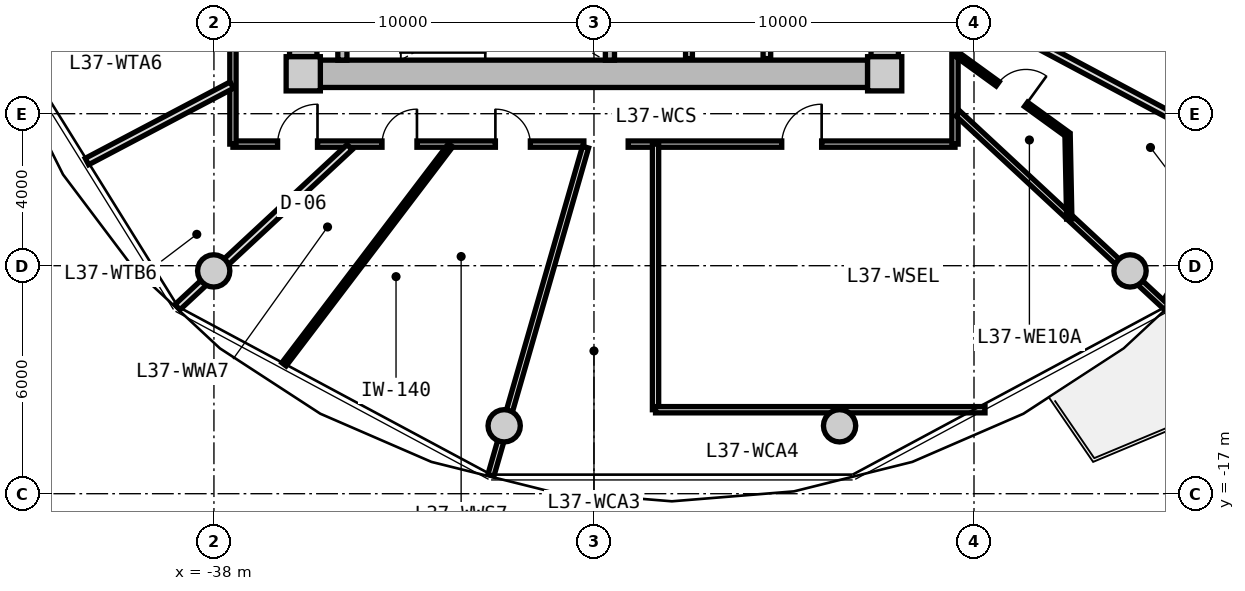
"""IFC4 building model, lengths in metres.
Left out: names, types, materials, properties, quantities, classifications, styles, units other than length and angle.
Written with IfcOpenShell. Run it as: python <this file> out.ifc"""

import sys

from ifc_helpers import new_model, si_unit, direction, frame, frame_2d, origin, origin_2d, place, context, subcontext, project, spatial, rectangle, circle, extrude, source, transform, mapped, element, fill, save


model = new_model("IFC4")
c1 = context("Model", 3, precision=1e-05, world=origin(), true_north=direction((0.0, 1.0)))
c2 = subcontext(c1, "Body", "Model", "MODEL_VIEW")
j1 = project(units=[si_unit("LENGTHUNIT", "METRE"), si_unit("PLANEANGLEUNIT", "RADIAN")], contexts=[c1])
p1 = place(None, origin())
s1 = spatial("IfcSite", under=j1, at=p1, CompositionType="ELEMENT")
p2 = place(p1, origin())
s2 = spatial("IfcBuilding", under=s1, at=p2, CompositionType="ELEMENT")
p3 = place(p2, frame((0.0, 0.0, 120.65)))
s3 = spatial("IfcBuildingStorey", under=s2, at=p3, CompositionType="ELEMENT", Elevation=120.65)
m1 = source(origin(), c2, "Body", "SweptSolid", [
    extrude(rectangle(XDim=0.9, YDim=0.9, at=origin_2d()), origin(), (0.0, 0.0, 1.0), 3.05),
])
for number, where, z_axis, x_axis in (
    (1, (-35.65, -5.95, 0.0), (0.0, 0.0, 1.0), (1.0, 0.0, 0.0)),
    (2, (-20.35, -5.95, 0.0), (0.0, 0.0, 1.0), (1.0, 0.0, 0.0)),
):
    element("IfcColumn", number, at=place(p3, frame(where, z_axis=z_axis, x_axis=x_axis)), inside=s3, PredefinedType="COLUMN", context=c2, shape_type="MappedRepresentation", body=[
        mapped(m1, transform((0.0, 0.0, 0.0), x_axis=(1.0, 0.0, 0.0), y_axis=(0.0, 1.0, 0.0), z_axis=(0.0, 0.0, 1.0), scale=1.0)),
    ])
m2 = source(origin(), c2, "Body", "SweptSolid", [
    extrude(rectangle(XDim=14.4, YDim=0.72, at=frame_2d((7.2, 0.0))), origin(), (0.0, 0.0, 1.0), 2.79),
])
p4 = place(p3, frame((-20.8, -5.95, 0.0), z_axis=(0.0, 0.0, 1.0), x_axis=(-1.0, 0.0, 0.0)))
e3 = element("IfcWall", 3, at=p4, inside=s3, PredefinedType="SHEAR", context=c2, shape_type="MappedRepresentation", body=[
    mapped(m2, transform((0.0, 0.0, 0.0), x_axis=(1.0, 0.0, 0.0), y_axis=(0.0, 1.0, 0.0), z_axis=(0.0, 0.0, 1.0), scale=1.0)),
])
m3 = source(origin(), c2, "Body", "SweptSolid", [
    extrude(rectangle(XDim=11.0, YDim=0.72, at=frame_2d((5.5, 0.0))), origin(), (0.0, 0.0, 1.0), 2.79),
])
p5 = place(p3, frame((-35.65, -5.5, 0.0), z_axis=(0.0, 0.0, 1.0), x_axis=(0.0, 1.0, 0.0)))
e4 = element("IfcWall", 4, at=p5, inside=s3, PredefinedType="SHEAR", context=c2, shape_type="MappedRepresentation", body=[
    mapped(m3, transform((0.0, 0.0, 0.0), x_axis=(1.0, 0.0, 0.0), y_axis=(0.0, 1.0, 0.0), z_axis=(0.0, 0.0, 1.0), scale=1.0)),
])
p6 = place(p5, frame((3.8, 0.0, 0.0)))
e5 = element("IfcOpeningElement", 5, at=p6, cuts=e4, PredefinedType="OPENING", context=c2, shape_type="SweptSolid", body=[
    extrude(rectangle(XDim=1.2, YDim=2.15, at=frame_2d((0.6, 1.075))), frame((0.0, 0.37, 0.0), z_axis=(0.0, -1.0, 0.0), x_axis=(1.0, 0.0, 0.0)), (0.0, 0.0, 1.0), 0.74),
])
p7 = place(p3, frame((-20.35, 5.5, 0.0), z_axis=(0.0, 0.0, 1.0), x_axis=(0.0, -1.0, 0.0)))
e6 = element("IfcWall", 6, at=p7, inside=s3, PredefinedType="SHEAR", context=c2, shape_type="MappedRepresentation", body=[
    mapped(m3, transform((0.0, 0.0, 0.0), x_axis=(1.0, 0.0, 0.0), y_axis=(0.0, 1.0, 0.0), z_axis=(0.0, 0.0, 1.0), scale=1.0)),
])
p8 = place(p7, frame((5.65, 0.0, 0.0)))
e7 = element("IfcOpeningElement", 7, at=p8, cuts=e6, PredefinedType="OPENING", context=c2, shape_type="SweptSolid", body=[
    extrude(rectangle(XDim=1.2, YDim=2.15, at=frame_2d((0.6, 1.075))), frame((0.0, 0.37, 0.0), z_axis=(0.0, -1.0, 0.0), x_axis=(1.0, 0.0, 0.0)), (0.0, 0.0, 1.0), 0.74),
])
m4 = source(origin(), c2, "Body", "SweptSolid", [
    extrude(circle(Radius=0.425, at=origin_2d()), origin(), (0.0, 0.0, 1.0), 3.05),
])
for number, where, z_axis, x_axis in (
    (8, (-38.006, -11.137, 0.0), (0.0, 0.0, 1.0), (1.0, 0.0, 0.0)),
    (9, (-30.363, -15.213, 0.0), (0.0, 0.0, 1.0), (1.0, 0.0, 0.0)),
    (10, (-21.537, -15.213, 0.0), (0.0, 0.0, 1.0), (1.0, 0.0, 0.0)),
    (11, (-13.894, -11.137, 0.0), (0.0, 0.0, 1.0), (1.0, 0.0, 0.0)),
):
    element("IfcColumn", number, at=place(p3, frame(where, z_axis=z_axis, x_axis=x_axis)), inside=s3, PredefinedType="COLUMN", context=c2, shape_type="MappedRepresentation", body=[
        mapped(m4, transform((0.0, 0.0, 0.0), x_axis=(1.0, 0.0, 0.0), y_axis=(0.0, 1.0, 0.0), z_axis=(0.0, 0.0, 1.0), scale=1.0)),
    ])
m5 = source(origin(), c2, "Body", "SweptSolid", [
    extrude(rectangle(XDim=9.014, YDim=0.29, at=frame_2d((4.507, 0.0))), origin(), (0.0, 0.0, 1.0), 2.79),
])
p9 = place(p3, frame((-8.196, -4.421, 0.0), z_axis=(0.0, 0.0, 1.0), x_axis=(-0.527732945084, -0.849410347637, 0.0)))
e12 = element("IfcWall", 12, at=p9, inside=s3, PredefinedType="SOLIDWALL", context=c2, shape_type="MappedRepresentation", body=[
    mapped(m5, transform((0.0, 0.0, 0.0), x_axis=(1.0, 0.0, 0.0), y_axis=(0.0, 1.0, 0.0), z_axis=(0.0, 0.0, 1.0), scale=1.0)),
])
p10 = place(p9, frame((6.98, 0.0, 0.0)))
e13 = element("IfcOpeningElement", 13, at=p10, cuts=e12, PredefinedType="OPENING", context=c2, shape_type="SweptSolid", body=[
    extrude(rectangle(XDim=1.15, YDim=2.25, at=frame_2d((0.575, 1.125))), frame((0.0, 0.155, 0.0), z_axis=(0.0, -1.0, 0.0), x_axis=(1.0, 0.0, 0.0)), (0.0, 0.0, 1.0), 0.31),
])
p11 = place(p9, frame((0.85, 0.0, 0.85)))
e14 = element("IfcOpeningElement", 14, at=p11, cuts=e12, PredefinedType="OPENING", context=c2, shape_type="SweptSolid", body=[
    extrude(rectangle(XDim=1.2, YDim=1.5, at=frame_2d((0.6, 0.75))), frame((0.0, 0.155, 0.0), z_axis=(0.0, -1.0, 0.0), x_axis=(1.0, 0.0, 0.0)), (0.0, 0.0, 1.0), 0.31),
])
m6 = source(origin(), c2, "Body", "SweptSolid", [
    extrude(rectangle(XDim=3.14, YDim=0.24, at=frame_2d((1.57, 0.0))), origin(), (0.0, 0.0, 1.0), 2.79),
])
for number, where, z_axis, x_axis in (
    (15, (-34.62, -5.59, 0.0), (0.0, 0.0, 1.0), (0.0, 1.0, 0.0)),
    (16, (-27.58, -5.59, 0.0), (0.0, 0.0, 1.0), (0.0, 1.0, 0.0)),
):
    element("IfcWall", number, at=place(p3, frame(where, z_axis=z_axis, x_axis=x_axis)), inside=s3, PredefinedType="PARTITIONING", context=c2, shape_type="MappedRepresentation", body=[
        mapped(m6, transform((0.0, 0.0, 0.0), x_axis=(1.0, 0.0, 0.0), y_axis=(0.0, 1.0, 0.0), z_axis=(0.0, 0.0, 1.0), scale=1.0)),
    ])
m7 = source(origin(), c2, "Body", "SweptSolid", [
    extrude(rectangle(XDim=3.8, YDim=0.2, at=frame_2d((1.9, 0.0))), origin(), (0.0, 0.0, 1.0), 2.775),
])
p12 = place(p3, frame((-23.45, -5.55, 0.0), z_axis=(0.0, 0.0, 1.0), x_axis=(0.0, 1.0, 0.0)))
e17 = element("IfcWall", 17, at=p12, inside=s3, PredefinedType="PARTITIONING", context=c2, shape_type="MappedRepresentation", body=[
    mapped(m7, transform((0.0, 0.0, 0.0), x_axis=(1.0, 0.0, 0.0), y_axis=(0.0, 1.0, 0.0), z_axis=(0.0, 0.0, 1.0), scale=1.0)),
])
m8 = source(origin(), c2, "Body", "SweptSolid", [
    extrude(rectangle(XDim=3.22, YDim=0.18, at=frame_2d((1.61, 0.0))), origin(), (0.0, 0.0, 1.0), 2.775),
])
p13 = place(p3, frame((-25.5, -5.55, 0.0), z_axis=(0.0, 0.0, 1.0), x_axis=(0.0, 1.0, 0.0)))
e18 = element("IfcWall", 18, at=p13, inside=s3, PredefinedType="PARTITIONING", context=c2, shape_type="MappedRepresentation", body=[
    mapped(m8, transform((0.0, 0.0, 0.0), x_axis=(1.0, 0.0, 0.0), y_axis=(0.0, 1.0, 0.0), z_axis=(0.0, 0.0, 1.0), scale=1.0)),
])
m9 = source(origin(), c2, "Body", "SweptSolid", [
    extrude(rectangle(XDim=8.6, YDim=0.165, at=frame_2d((4.3, 0.0))), origin(), (0.0, 0.0, 1.0), 2.775),
])
p14 = place(p3, frame((-18.5, -7.8, 0.0), z_axis=(0.0, 0.0, 1.0), x_axis=(-1.0, 0.0, 0.0)))
e19 = element("IfcWall", 19, at=p14, inside=s3, PredefinedType="PARTITIONING", context=c2, shape_type="MappedRepresentation", body=[
    mapped(m9, transform((0.0, 0.0, 0.0), x_axis=(1.0, 0.0, 0.0), y_axis=(0.0, 1.0, 0.0), z_axis=(0.0, 0.0, 1.0), scale=1.0)),
])
p15 = place(p14, frame((3.509, 0.0, 0.0)))
e20 = element("IfcOpeningElement", 20, at=p15, cuts=e19, PredefinedType="OPENING", context=c2, shape_type="SweptSolid", body=[
    extrude(rectangle(XDim=1.05, YDim=2.15, at=frame_2d((0.525, 1.075))), frame((0.0, 0.093, 0.0), z_axis=(0.0, -1.0, 0.0), x_axis=(1.0, 0.0, 0.0)), (0.0, 0.0, 1.0), 0.185),
])
m10 = source(origin(), c2, "Body", "SweptSolid", [
    extrude(rectangle(XDim=9.234, YDim=0.165, at=frame_2d((4.617, 0.0))), origin(), (0.0, 0.0, 1.0), 2.775),
])
p16 = place(p3, frame((-28.266, -7.8, 0.0), z_axis=(0.0, 0.0, 1.0), x_axis=(-1.0, 0.0, 0.0)))
e21 = element("IfcWall", 21, at=p16, inside=s3, PredefinedType="PARTITIONING", context=c2, shape_type="MappedRepresentation", body=[
    mapped(m10, transform((0.0, 0.0, 0.0), x_axis=(1.0, 0.0, 0.0), y_axis=(0.0, 1.0, 0.0), z_axis=(0.0, 0.0, 1.0), scale=1.0)),
])
p17 = place(p16, frame((7.009, 0.0, 0.0)))
e22 = element("IfcOpeningElement", 22, at=p17, cuts=e21, PredefinedType="OPENING", context=c2, shape_type="SweptSolid", body=[
    extrude(rectangle(XDim=1.05, YDim=2.15, at=frame_2d((0.525, 1.075))), frame((0.0, 0.093, 0.0), z_axis=(0.0, -1.0, 0.0), x_axis=(1.0, 0.0, 0.0)), (0.0, 0.0, 1.0), 0.185),
])
p18 = place(p16, frame((4.392, 0.0, 0.0)))
e23 = element("IfcOpeningElement", 23, at=p18, cuts=e21, PredefinedType="OPENING", context=c2, shape_type="SweptSolid", body=[
    extrude(rectangle(XDim=0.92, YDim=2.1, at=frame_2d((0.46, 1.05))), frame((0.0, 0.093, 0.0), z_axis=(0.0, -1.0, 0.0), x_axis=(1.0, 0.0, 0.0)), (0.0, 0.0, 1.0), 0.185),
])
p19 = place(p16, frame((1.408, 0.0, 0.0)))
e24 = element("IfcOpeningElement", 24, at=p19, cuts=e21, PredefinedType="OPENING", context=c2, shape_type="SweptSolid", body=[
    extrude(rectangle(XDim=0.92, YDim=2.1, at=frame_2d((0.46, 1.05))), frame((0.0, 0.093, 0.0), z_axis=(0.0, -1.0, 0.0), x_axis=(1.0, 0.0, 0.0)), (0.0, 0.0, 1.0), 0.185),
])
m11 = source(origin(), c2, "Body", "SweptSolid", [
    extrude(rectangle(XDim=15.6, YDim=0.165, at=frame_2d((7.8, 0.0))), origin(), (0.0, 0.0, 1.0), 2.775),
])
p20 = place(p3, frame((-37.5, -7.8, 0.0), z_axis=(0.0, 0.0, 1.0), x_axis=(0.0, 1.0, 0.0)))
e25 = element("IfcWall", 25, at=p20, inside=s3, PredefinedType="PARTITIONING", context=c2, shape_type="MappedRepresentation", body=[
    mapped(m11, transform((0.0, 0.0, 0.0), x_axis=(1.0, 0.0, 0.0), y_axis=(0.0, 1.0, 0.0), z_axis=(0.0, 0.0, 1.0), scale=1.0)),
])
p21 = place(p20, frame((11.994, 0.0, 0.0)))
e26 = element("IfcOpeningElement", 26, at=p21, cuts=e25, PredefinedType="OPENING", context=c2, shape_type="SweptSolid", body=[
    extrude(rectangle(XDim=1.25, YDim=2.2, at=frame_2d((0.625, 1.1))), frame((0.0, 0.093, 0.0), z_axis=(0.0, -1.0, 0.0), x_axis=(1.0, 0.0, 0.0)), (0.0, 0.0, 1.0), 0.185),
])
p22 = place(p20, frame((7.984, 0.0, 0.0)))
e27 = element("IfcOpeningElement", 27, at=p22, cuts=e25, PredefinedType="OPENING", context=c2, shape_type="SweptSolid", body=[
    extrude(rectangle(XDim=1.05, YDim=2.15, at=frame_2d((0.525, 1.075))), frame((0.0, 0.093, 0.0), z_axis=(0.0, -1.0, 0.0), x_axis=(1.0, 0.0, 0.0)), (0.0, 0.0, 1.0), 0.185),
])
p23 = place(p20, frame((5.777, 0.0, 0.0)))
e28 = element("IfcOpeningElement", 28, at=p23, cuts=e25, PredefinedType="OPENING", context=c2, shape_type="SweptSolid", body=[
    extrude(rectangle(XDim=1.05, YDim=2.15, at=frame_2d((0.525, 1.075))), frame((0.0, 0.093, 0.0), z_axis=(0.0, -1.0, 0.0), x_axis=(1.0, 0.0, 0.0)), (0.0, 0.0, 1.0), 0.185),
])
p24 = place(p20, frame((2.676, 0.0, 0.0)))
e29 = element("IfcOpeningElement", 29, at=p24, cuts=e25, PredefinedType="OPENING", context=c2, shape_type="SweptSolid", body=[
    extrude(rectangle(XDim=1.05, YDim=2.15, at=frame_2d((0.525, 1.075))), frame((0.0, 0.093, 0.0), z_axis=(0.0, -1.0, 0.0), x_axis=(1.0, 0.0, 0.0)), (0.0, 0.0, 1.0), 0.185),
])
p25 = place(p3, frame((-18.5, 7.8, 0.0), z_axis=(0.0, 0.0, 1.0), x_axis=(0.0, -1.0, 0.0)))
e30 = element("IfcWall", 30, at=p25, inside=s3, PredefinedType="PARTITIONING", context=c2, shape_type="MappedRepresentation", body=[
    mapped(m11, transform((0.0, 0.0, 0.0), x_axis=(1.0, 0.0, 0.0), y_axis=(0.0, 1.0, 0.0), z_axis=(0.0, 0.0, 1.0), scale=1.0)),
])
p26 = place(p25, frame((12.002, 0.0, 0.0)))
e31 = element("IfcOpeningElement", 31, at=p26, cuts=e30, PredefinedType="OPENING", context=c2, shape_type="SweptSolid", body=[
    extrude(rectangle(XDim=1.05, YDim=2.15, at=frame_2d((0.525, 1.075))), frame((0.0, 0.093, 0.0), z_axis=(0.0, -1.0, 0.0), x_axis=(1.0, 0.0, 0.0)), (0.0, 0.0, 1.0), 0.185),
])
p27 = place(p25, frame((10.211, 0.0, 0.0)))
e32 = element("IfcOpeningElement", 32, at=p27, cuts=e30, PredefinedType="OPENING", context=c2, shape_type="SweptSolid", body=[
    extrude(rectangle(XDim=1.05, YDim=2.15, at=frame_2d((0.525, 1.075))), frame((0.0, 0.093, 0.0), z_axis=(0.0, -1.0, 0.0), x_axis=(1.0, 0.0, 0.0)), (0.0, 0.0, 1.0), 0.185),
])
p28 = place(p25, frame((7.722, 0.0, 0.0)))
e33 = element("IfcOpeningElement", 33, at=p28, cuts=e30, PredefinedType="OPENING", context=c2, shape_type="SweptSolid", body=[
    extrude(rectangle(XDim=1.05, YDim=2.15, at=frame_2d((0.525, 1.075))), frame((0.0, 0.093, 0.0), z_axis=(0.0, -1.0, 0.0), x_axis=(1.0, 0.0, 0.0)), (0.0, 0.0, 1.0), 0.185),
])
p29 = place(p25, frame((6.291, 0.0, 0.0)))
e34 = element("IfcOpeningElement", 34, at=p29, cuts=e30, PredefinedType="OPENING", context=c2, shape_type="SweptSolid", body=[
    extrude(rectangle(XDim=1.05, YDim=2.15, at=frame_2d((0.525, 1.075))), frame((0.0, 0.093, 0.0), z_axis=(0.0, -1.0, 0.0), x_axis=(1.0, 0.0, 0.0)), (0.0, 0.0, 1.0), 0.185),
])
p30 = place(p25, frame((4.296, 0.0, 0.0)))
e35 = element("IfcOpeningElement", 35, at=p30, cuts=e30, PredefinedType="OPENING", context=c2, shape_type="SweptSolid", body=[
    extrude(rectangle(XDim=1.05, YDim=2.15, at=frame_2d((0.525, 1.075))), frame((0.0, 0.093, 0.0), z_axis=(0.0, -1.0, 0.0), x_axis=(1.0, 0.0, 0.0)), (0.0, 0.0, 1.0), 0.185),
])
p31 = place(p25, frame((1.654, 0.0, 0.0)))
e36 = element("IfcOpeningElement", 36, at=p31, cuts=e30, PredefinedType="OPENING", context=c2, shape_type="SweptSolid", body=[
    extrude(rectangle(XDim=1.05, YDim=2.15, at=frame_2d((0.525, 1.075))), frame((0.0, 0.093, 0.0), z_axis=(0.0, -1.0, 0.0), x_axis=(1.0, 0.0, 0.0)), (0.0, 0.0, 1.0), 0.185),
])
m12 = source(origin(), c2, "Body", "SweptSolid", [
    extrude(rectangle(XDim=8.989, YDim=0.165, at=frame_2d((4.495, 0.0))), origin(), (0.0, 0.0, 1.0), 2.275),
])
p32 = place(p3, frame((-28.222, -7.88, 0.0), z_axis=(0.0, 0.0, 1.0), x_axis=(-0.27702323008, -0.960863221274, 0.0)))
e37 = element("IfcWall", 37, at=p32, inside=s3, PredefinedType="PARTITIONING", context=c2, shape_type="MappedRepresentation", body=[
    mapped(m12, transform((0.0, 0.0, 0.0), x_axis=(1.0, 0.0, 0.0), y_axis=(0.0, 1.0, 0.0), z_axis=(0.0, 0.0, 1.0), scale=1.0)),
])
m13 = source(origin(), c2, "Body", "SweptSolid", [
    extrude(rectangle(XDim=7.482, YDim=0.165, at=frame_2d((3.741, 0.0))), origin(), (0.0, 0.0, 1.0), 2.275),
])
p33 = place(p3, frame((-18.42, -6.998, 0.0), z_axis=(0.0, 0.0, 1.0), x_axis=(0.732508698043, -0.680757671489, 0.0)))
e38 = element("IfcWall", 38, at=p33, inside=s3, PredefinedType="PARTITIONING", context=c2, shape_type="MappedRepresentation", body=[
    mapped(m13, transform((0.0, 0.0, 0.0), x_axis=(1.0, 0.0, 0.0), y_axis=(0.0, 1.0, 0.0), z_axis=(0.0, 0.0, 1.0), scale=1.0)),
])
m14 = source(origin(), c2, "Body", "SweptSolid", [
    extrude(rectangle(XDim=6.99, YDim=0.165, at=frame_2d((3.495, 0.0))), origin(), (0.0, 0.0, 1.0), 2.775),
])
p34 = place(p3, frame((-26.38, -14.79, 0.0), z_axis=(0.0, 0.0, 1.0), x_axis=(0.0, 1.0, 0.0)))
e39 = element("IfcWall", 39, at=p34, inside=s3, PredefinedType="PARTITIONING", context=c2, shape_type="MappedRepresentation", body=[
    mapped(m14, transform((0.0, 0.0, 0.0), x_axis=(1.0, 0.0, 0.0), y_axis=(0.0, 1.0, 0.0), z_axis=(0.0, 0.0, 1.0), scale=1.0)),
])
m15 = source(origin(), c2, "Body", "SweptSolid", [
    extrude(rectangle(XDim=8.669, YDim=0.165, at=frame_2d((4.335, 0.0))), origin(), (0.0, 0.0, 1.0), 2.775),
])
p35 = place(p3, frame((-26.38, -14.79, 0.0), z_axis=(0.0, 0.0, 1.0), x_axis=(1.0, 0.0, 0.0)))
e40 = element("IfcWall", 40, at=p35, inside=s3, PredefinedType="PARTITIONING", context=c2, shape_type="MappedRepresentation", body=[
    mapped(m15, transform((0.0, 0.0, 0.0), x_axis=(1.0, 0.0, 0.0), y_axis=(0.0, 1.0, 0.0), z_axis=(0.0, 0.0, 1.0), scale=1.0)),
])
m16 = source(origin(), c2, "Body", "SweptSolid", [
    extrude(rectangle(XDim=6.187, YDim=0.19, at=frame_2d((3.093, 0.0))), origin(), (0.0, 0.0, 1.0), 2.275),
])
p36 = place(p3, frame((-34.429, -7.88, 0.0), z_axis=(0.0, 0.0, 1.0), x_axis=(-0.732501077882, -0.680765870841, 0.0)))
e41 = element("IfcWall", 41, at=p36, inside=s3, PredefinedType="PARTITIONING", context=c2, shape_type="MappedRepresentation", body=[
    mapped(m16, transform((0.0, 0.0, 0.0), x_axis=(1.0, 0.0, 0.0), y_axis=(0.0, 1.0, 0.0), z_axis=(0.0, 0.0, 1.0), scale=1.0)),
])
m17 = source(origin(), c2, "Body", "SweptSolid", [
    extrude(rectangle(XDim=4.31, YDim=0.19, at=frame_2d((2.155, 0.0))), origin(), (0.0, 0.0, 1.0), 2.775),
])
p37 = place(p3, frame((-37.53, -6.248, 0.0), z_axis=(0.0, 0.0, 1.0), x_axis=(-0.884459441503, -0.466617076773, 0.0)))
e42 = element("IfcWall", 42, at=p37, inside=s3, PredefinedType="PARTITIONING", context=c2, shape_type="MappedRepresentation", body=[
    mapped(m17, transform((0.0, 0.0, 0.0), x_axis=(1.0, 0.0, 0.0), y_axis=(0.0, 1.0, 0.0), z_axis=(0.0, 0.0, 1.0), scale=1.0)),
])
m18 = source(origin(), c2, "Body", "SweptSolid", [
    extrude(rectangle(XDim=7.243, YDim=0.14, at=frame_2d((3.621, 0.0))), origin(), (0.0, 0.0, 1.0), 2.775),
])
p38 = place(p3, frame((-31.774, -7.83, 0.0), z_axis=(0.0, 0.0, 1.0), x_axis=(-0.605111472002, -0.796140757939, 0.0)))
e43 = element("IfcWall", 43, at=p38, inside=s3, PredefinedType="PARTITIONING", context=c2, shape_type="MappedRepresentation", body=[
    mapped(m18, transform((0.0, 0.0, 0.0), x_axis=(1.0, 0.0, 0.0), y_axis=(0.0, 1.0, 0.0), z_axis=(0.0, 0.0, 1.0), scale=1.0)),
])
m19 = source(origin(), c2, "Body", "SweptSolid", [
    extrude(rectangle(XDim=8.744, YDim=0.19, at=frame_2d((4.372, 0.0))), origin(), (0.0, 0.0, 1.0), 2.775),
])
p39 = place(p3, frame((-18.273, -4.142, 0.0), z_axis=(0.0, 0.0, 1.0), x_axis=(0.882252449936, -0.470776607938, 0.0)))
e44 = element("IfcWall", 44, at=p39, inside=s3, PredefinedType="PARTITIONING", context=c2, shape_type="MappedRepresentation", body=[
    mapped(m19, transform((0.0, 0.0, 0.0), x_axis=(1.0, 0.0, 0.0), y_axis=(0.0, 1.0, 0.0), z_axis=(0.0, 0.0, 1.0), scale=1.0)),
])
m20 = source(origin(), c2, "Body", "SweptSolid", [
    extrude(rectangle(XDim=3.621, YDim=0.14, at=frame_2d((1.811, 0.0))), origin(), (0.0, 0.0, 1.0), 2.775),
])
p40 = place(p3, frame((-18.47, -5.422, 0.0), z_axis=(0.0, 0.0, 1.0), x_axis=(0.80968252222, -0.586868139544, 0.0)))
e45 = element("IfcWall", 45, at=p40, inside=s3, PredefinedType="PARTITIONING", context=c2, shape_type="MappedRepresentation", body=[
    mapped(m20, transform((0.0, 0.0, 0.0), x_axis=(1.0, 0.0, 0.0), y_axis=(0.0, 1.0, 0.0), z_axis=(0.0, 0.0, 1.0), scale=1.0)),
])
p41 = place(p40, frame((1.351, 0.0, 0.0)))
e46 = element("IfcOpeningElement", 46, at=p41, cuts=e45, PredefinedType="OPENING", context=c2, shape_type="SweptSolid", body=[
    extrude(rectangle(XDim=0.92, YDim=2.1, at=frame_2d((0.46, 1.05))), frame((0.0, 0.08, 0.0), z_axis=(0.0, -1.0, 0.0), x_axis=(1.0, 0.0, 0.0)), (0.0, 0.0, 1.0), 0.16),
])
m21 = source(origin(), c2, "Body", "SweptSolid", [
    extrude(rectangle(XDim=2.225, YDim=0.14, at=frame_2d((1.112, 0.0))), origin(), (0.0, 0.0, 1.0), 2.775),
])
p42 = place(p3, frame((-15.538, -7.547, 0.0), z_axis=(0.0, 0.0, 1.0), x_axis=(0.019971869027, -0.999800542332, 0.0)))
e47 = element("IfcWall", 47, at=p42, inside=s3, PredefinedType="PARTITIONING", context=c2, shape_type="MappedRepresentation", body=[
    mapped(m21, transform((0.0, 0.0, 0.0), x_axis=(1.0, 0.0, 0.0), y_axis=(0.0, 1.0, 0.0), z_axis=(0.0, 0.0, 1.0), scale=1.0)),
])
m22 = source(origin(), c2, "Body", "SweptSolid", [
    extrude(rectangle(XDim=1.05, YDim=2.15, at=frame_2d((0.525, 1.075))), frame((0.0, 0.025, 0.0), z_axis=(0.0, -1.0, 0.0), x_axis=(1.0, 0.0, 0.0)), (0.0, 0.0, 1.0), 0.05),
])
p43 = place(p15, frame((1.05, 0.0, 0.0), z_axis=(0.0, 0.0, 1.0), x_axis=(-1.0, 0.0, 0.0)))
e48 = element("IfcDoor", 48, at=p43, inside=s3, OperationType="SINGLE_SWING_RIGHT", PredefinedType="DOOR", context=c2, shape_type="MappedRepresentation", body=[
    mapped(m22, transform((0.0, 0.0, 0.0), x_axis=(1.0, 0.0, 0.0), y_axis=(0.0, 1.0, 0.0), z_axis=(0.0, 0.0, 1.0), scale=1.0)),
])
fill(e20, e48)
p44 = place(p17, frame((1.05, 0.0, 0.0), z_axis=(0.0, 0.0, 1.0), x_axis=(-1.0, 0.0, 0.0)))
e49 = element("IfcDoor", 49, at=p44, inside=s3, OperationType="SINGLE_SWING_RIGHT", PredefinedType="DOOR", context=c2, shape_type="MappedRepresentation", body=[
    mapped(m22, transform((0.0, 0.0, 0.0), x_axis=(1.0, 0.0, 0.0), y_axis=(0.0, 1.0, 0.0), z_axis=(0.0, 0.0, 1.0), scale=1.0)),
])
fill(e22, e49)
m23 = source(origin(), c2, "Body", "SweptSolid", [
    extrude(rectangle(XDim=0.92, YDim=2.1, at=frame_2d((0.46, 1.05))), frame((0.0, 0.025, 0.0), z_axis=(0.0, -1.0, 0.0), x_axis=(1.0, 0.0, 0.0)), (0.0, 0.0, 1.0), 0.05),
])
p45 = place(p18, frame((0.92, 0.0, 0.0), z_axis=(0.0, 0.0, 1.0), x_axis=(-1.0, 0.0, 0.0)))
e50 = element("IfcDoor", 50, at=p45, inside=s3, OperationType="SINGLE_SWING_RIGHT", PredefinedType="DOOR", context=c2, shape_type="MappedRepresentation", body=[
    mapped(m23, transform((0.0, 0.0, 0.0), x_axis=(1.0, 0.0, 0.0), y_axis=(0.0, 1.0, 0.0), z_axis=(0.0, 0.0, 1.0), scale=1.0)),
])
fill(e23, e50)
p46 = place(p19, frame((0.92, 0.0, 0.0), z_axis=(0.0, 0.0, 1.0), x_axis=(-1.0, 0.0, 0.0)))
e51 = element("IfcDoor", 51, at=p46, inside=s3, OperationType="SINGLE_SWING_LEFT", PredefinedType="DOOR", context=c2, shape_type="MappedRepresentation", body=[
    mapped(m23, transform((0.0, 0.0, 0.0), x_axis=(1.0, 0.0, 0.0), y_axis=(0.0, 1.0, 0.0), z_axis=(0.0, 0.0, 1.0), scale=1.0)),
])
fill(e24, e51)
p47 = place(p41, origin())
e52 = element("IfcDoor", 52, at=p47, inside=s3, OperationType="SINGLE_SWING_RIGHT", PredefinedType="DOOR", context=c2, shape_type="MappedRepresentation", body=[
    mapped(m23, transform((0.0, 0.0, 0.0), x_axis=(1.0, 0.0, 0.0), y_axis=(0.0, 1.0, 0.0), z_axis=(0.0, 0.0, 1.0), scale=1.0)),
])
fill(e46, e52)
save(model, sys.argv[1])
